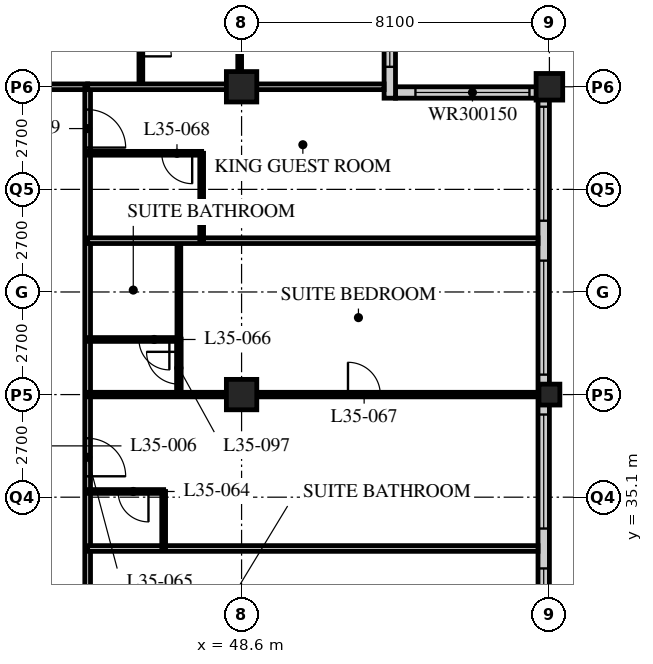
"""IFC4 building model, lengths in metres.
Left out: names, types, materials, properties, quantities, classifications, styles, units other than length and angle.
Written with IfcOpenShell. Run it as: python <this file> out.ifc"""

import sys

from ifc_helpers import new_model, si_unit, direction, frame, frame_2d, origin, origin_2d, place, context, subcontext, project, spatial, rectangle, hollow_rectangle, extrude, element, fill, save


model = new_model("IFC4")
c1 = context("Model", 3, precision=1e-05, world=origin(), true_north=direction((0.0, 1.0)))
c2 = subcontext(c1, "Body", "Model", "MODEL_VIEW")
j1 = project(units=[si_unit("LENGTHUNIT", "METRE"), si_unit("PLANEANGLEUNIT", "RADIAN")], contexts=[c1])
p1 = place(None, origin())
s1 = spatial("IfcSite", under=j1, at=p1, CompositionType="ELEMENT")
p2 = place(p1, origin())
s2 = spatial("IfcBuilding", under=s1, at=p2, CompositionType="ELEMENT")
p3 = place(p2, frame((0.0, 0.0, 137.4)))
s3 = spatial("IfcBuildingStorey", under=s2, at=p3, CompositionType="ELEMENT", Elevation=137.4)
for number, where, z_axis, x_axis in (
    (1, (48.6, 37.8, 0.0), (0.0, 0.0, 1.0), (1.0, 0.0, 0.0)),
    (2, (48.6, 45.9, 0.0), (0.0, 0.0, 1.0), (1.0, 0.0, 0.0)),
):
    element("IfcColumn", number, at=place(p3, frame(where, z_axis=z_axis, x_axis=x_axis)), inside=s3, PredefinedType="COLUMN", context=c2, shape_type="SweptSolid", body=[
        extrude(hollow_rectangle(XDim=0.8, YDim=0.8, WallThickness=0.08, at=origin_2d()), origin(), (0.0, 0.0, 1.0), 3.4),
    ])
p4 = place(p3, frame((56.7, 37.8, 0.0), z_axis=(0.0, 0.0, 1.0), x_axis=(1.0, 0.0, 0.0)))
e3 = element("IfcColumn", 3, at=p4, inside=s3, PredefinedType="COLUMN", context=c2, shape_type="SweptSolid", body=[
    extrude(hollow_rectangle(XDim=0.55, YDim=0.55, WallThickness=0.04, at=origin_2d()), origin(), (0.0, 0.0, 1.0), 3.4),
])
p5 = place(p3, frame((56.7, 45.9, 0.0), z_axis=(0.0, 0.0, 1.0), x_axis=(1.0, 0.0, 0.0)))
e4 = element("IfcColumn", 4, at=p5, inside=s3, PredefinedType="COLUMN", context=c2, shape_type="SweptSolid", body=[
    extrude(hollow_rectangle(XDim=0.7, YDim=0.7, WallThickness=0.07, at=origin_2d()), origin(), (0.0, 0.0, 1.0), 3.4),
])
p6 = place(p3, frame((56.55, 13.8, 0.0), z_axis=(0.0, 0.0, 1.0), x_axis=(0.0, 1.0, 0.0)))
e5 = element("IfcWall", 5, at=p6, inside=s3, PredefinedType="SOLIDWALL", context=c2, shape_type="SweptSolid", body=[
    extrude(rectangle(XDim=32.1, YDim=0.3, at=frame_2d((16.05, 0.0))), origin(), (0.0, 0.0, 1.0), 3.19),
])
p7 = place(p6, frame((0.225, 0.0, 0.9)))
e6 = element("IfcOpeningElement", 6, at=p7, cuts=e5, PredefinedType="OPENING", context=c2, shape_type="SweptSolid", body=[
    extrude(rectangle(XDim=3.0, YDim=2.0, at=frame_2d((1.5, 1.0))), frame((0.0, 0.16, 0.0), z_axis=(0.0, -1.0, 0.0), x_axis=(1.0, 0.0, 0.0)), (0.0, 0.0, 1.0), 0.32),
])
p8 = place(p6, frame((4.275, 0.0, 0.9)))
e7 = element("IfcOpeningElement", 7, at=p8, cuts=e5, PredefinedType="OPENING", context=c2, shape_type="SweptSolid", body=[
    extrude(rectangle(XDim=3.0, YDim=2.0, at=frame_2d((1.5, 1.0))), frame((0.0, 0.16, 0.0), z_axis=(0.0, -1.0, 0.0), x_axis=(1.0, 0.0, 0.0)), (0.0, 0.0, 1.0), 0.32),
])
p9 = place(p6, frame((8.325, 0.0, 0.9)))
e8 = element("IfcOpeningElement", 8, at=p9, cuts=e5, PredefinedType="OPENING", context=c2, shape_type="SweptSolid", body=[
    extrude(rectangle(XDim=3.0, YDim=2.0, at=frame_2d((1.5, 1.0))), frame((0.0, 0.16, 0.0), z_axis=(0.0, -1.0, 0.0), x_axis=(1.0, 0.0, 0.0)), (0.0, 0.0, 1.0), 0.32),
])
p10 = place(p6, frame((12.375, 0.0, 0.9)))
e9 = element("IfcOpeningElement", 9, at=p10, cuts=e5, PredefinedType="OPENING", context=c2, shape_type="SweptSolid", body=[
    extrude(rectangle(XDim=3.0, YDim=2.0, at=frame_2d((1.5, 1.0))), frame((0.0, 0.16, 0.0), z_axis=(0.0, -1.0, 0.0), x_axis=(1.0, 0.0, 0.0)), (0.0, 0.0, 1.0), 0.32),
])
p11 = place(p6, frame((16.425, 0.0, 0.9)))
e10 = element("IfcOpeningElement", 10, at=p11, cuts=e5, PredefinedType="OPENING", context=c2, shape_type="SweptSolid", body=[
    extrude(rectangle(XDim=3.0, YDim=2.0, at=frame_2d((1.5, 1.0))), frame((0.0, 0.16, 0.0), z_axis=(0.0, -1.0, 0.0), x_axis=(1.0, 0.0, 0.0)), (0.0, 0.0, 1.0), 0.32),
])
p12 = place(p6, frame((20.475, 0.0, 0.9)))
e11 = element("IfcOpeningElement", 11, at=p12, cuts=e5, PredefinedType="OPENING", context=c2, shape_type="SweptSolid", body=[
    extrude(rectangle(XDim=3.0, YDim=2.0, at=frame_2d((1.5, 1.0))), frame((0.0, 0.16, 0.0), z_axis=(0.0, -1.0, 0.0), x_axis=(1.0, 0.0, 0.0)), (0.0, 0.0, 1.0), 0.32),
])
p13 = place(p6, frame((24.525, 0.0, 0.9)))
e12 = element("IfcOpeningElement", 12, at=p13, cuts=e5, PredefinedType="OPENING", context=c2, shape_type="SweptSolid", body=[
    extrude(rectangle(XDim=3.0, YDim=2.0, at=frame_2d((1.5, 1.0))), frame((0.0, 0.16, 0.0), z_axis=(0.0, -1.0, 0.0), x_axis=(1.0, 0.0, 0.0)), (0.0, 0.0, 1.0), 0.32),
])
p14 = place(p6, frame((28.575, 0.0, 0.9)))
e13 = element("IfcOpeningElement", 13, at=p14, cuts=e5, PredefinedType="OPENING", context=c2, shape_type="SweptSolid", body=[
    extrude(rectangle(XDim=3.0, YDim=2.0, at=frame_2d((1.5, 1.0))), frame((0.0, 0.16, 0.0), z_axis=(0.0, -1.0, 0.0), x_axis=(1.0, 0.0, 0.0)), (0.0, 0.0, 1.0), 0.32),
])
p15 = place(p3, frame((56.4, 45.75, 0.0), z_axis=(0.0, 0.0, 1.0), x_axis=(-1.0, 0.0, 0.0)))
e14 = element("IfcWall", 14, at=p15, inside=s3, PredefinedType="SOLIDWALL", context=c2, shape_type="SweptSolid", body=[
    extrude(rectangle(XDim=3.75, YDim=0.3, at=frame_2d((1.875, 0.0))), origin(), (0.0, 0.0, 1.0), 3.19),
])
p16 = place(p15, frame((0.225, 0.0, 0.9)))
e15 = element("IfcOpeningElement", 15, at=p16, cuts=e14, PredefinedType="OPENING", context=c2, shape_type="SweptSolid", body=[
    extrude(rectangle(XDim=3.0, YDim=1.5, at=frame_2d((1.5, 0.75))), frame((0.0, 0.16, 0.0), z_axis=(0.0, -1.0, 0.0), x_axis=(1.0, 0.0, 0.0)), (0.0, 0.0, 1.0), 0.32),
])
p17 = place(p3, frame((52.5, 45.6, 0.0), z_axis=(0.0, 0.0, 1.0), x_axis=(0.0, 1.0, 0.0)))
e16 = element("IfcWall", 16, at=p17, inside=s3, PredefinedType="SOLIDWALL", context=c2, shape_type="SweptSolid", body=[
    extrude(rectangle(XDim=4.35, YDim=0.3, at=frame_2d((2.175, 0.0))), origin(), (0.0, 0.0, 1.0), 3.19),
])
p18 = place(p17, frame((0.825, 0.0, 0.9)))
e17 = element("IfcOpeningElement", 17, at=p18, cuts=e16, PredefinedType="OPENING", context=c2, shape_type="SweptSolid", body=[
    extrude(rectangle(XDim=3.0, YDim=1.5, at=frame_2d((1.5, 0.75))), frame((0.0, 0.16, 0.0), z_axis=(0.0, -1.0, 0.0), x_axis=(1.0, 0.0, 0.0)), (0.0, 0.0, 1.0), 0.32),
])
p19 = place(p3, frame((8.1, 45.9, 0.0), z_axis=(0.0, 0.0, 1.0), x_axis=(1.0, 0.0, 0.0)))
e18 = element("IfcWall", 18, at=p19, inside=s3, PredefinedType="PARTITIONING", context=c2, shape_type="SweptSolid", body=[
    extrude(rectangle(XDim=36.45, YDim=0.15, at=frame_2d((18.225, 0.0))), origin(), (0.0, 0.0, 1.0), 2.578),
])
p20 = place(p19, frame((9.625, 0.0, 0.0)))
e19 = element("IfcOpeningElement", 19, at=p20, cuts=e18, PredefinedType="OPENING", context=c2, shape_type="SweptSolid", body=[
    extrude(rectangle(XDim=1.0, YDim=2.1, at=frame_2d((0.5, 1.05))), frame((0.0, 0.085, 0.0), z_axis=(0.0, -1.0, 0.0), x_axis=(1.0, 0.0, 0.0)), (0.0, 0.0, 1.0), 0.17),
])
p21 = place(p19, frame((21.775, 0.0, 0.0)))
e20 = element("IfcOpeningElement", 20, at=p21, cuts=e18, PredefinedType="OPENING", context=c2, shape_type="SweptSolid", body=[
    extrude(rectangle(XDim=1.0, YDim=2.1, at=frame_2d((0.5, 1.05))), frame((0.0, 0.085, 0.0), z_axis=(0.0, -1.0, 0.0), x_axis=(1.0, 0.0, 0.0)), (0.0, 0.0, 1.0), 0.17),
])
p22 = place(p19, frame((28.95, 0.0, 0.0)))
e21 = element("IfcOpeningElement", 21, at=p22, cuts=e18, PredefinedType="OPENING", context=c2, shape_type="SweptSolid", body=[
    extrude(rectangle(XDim=1.0, YDim=2.1, at=frame_2d((0.5, 1.05))), frame((0.0, 0.085, 0.0), z_axis=(0.0, -1.0, 0.0), x_axis=(1.0, 0.0, 0.0)), (0.0, 0.0, 1.0), 0.17),
])
p23 = place(p19, frame((33.925, 0.0, 0.0)))
e22 = element("IfcOpeningElement", 22, at=p23, cuts=e18, PredefinedType="OPENING", context=c2, shape_type="SweptSolid", body=[
    extrude(rectangle(XDim=1.0, YDim=2.1, at=frame_2d((0.5, 1.05))), frame((0.0, 0.085, 0.0), z_axis=(0.0, -1.0, 0.0), x_axis=(1.0, 0.0, 0.0)), (0.0, 0.0, 1.0), 0.17),
])
p24 = place(p19, frame((2.625, 0.0, 0.0)))
e23 = element("IfcOpeningElement", 23, at=p24, cuts=e18, PredefinedType="OPENING", context=c2, shape_type="SweptSolid", body=[
    extrude(rectangle(XDim=1.0, YDim=2.1, at=frame_2d((0.5, 1.05))), frame((0.0, 0.085, 0.0), z_axis=(0.0, -1.0, 0.0), x_axis=(1.0, 0.0, 0.0)), (0.0, 0.0, 1.0), 0.17),
])
p25 = place(p3, frame((44.55, 17.55, 0.0), z_axis=(0.0, 0.0, 1.0), x_axis=(0.0, 1.0, 0.0)))
e24 = element("IfcWall", 24, at=p25, inside=s3, PredefinedType="PARTITIONING", context=c2, shape_type="SweptSolid", body=[
    extrude(rectangle(XDim=28.35, YDim=0.15, at=frame_2d((14.175, 0.0))), origin(), (0.0, 0.0, 1.0), 3.19),
])
p26 = place(p25, frame((2.75, 0.0, 0.0)))
e25 = element("IfcOpeningElement", 25, at=p26, cuts=e24, PredefinedType="OPENING", context=c2, shape_type="SweptSolid", body=[
    extrude(rectangle(XDim=1.0, YDim=2.1, at=frame_2d((0.5, 1.05))), frame((0.0, 0.085, 0.0), z_axis=(0.0, -1.0, 0.0), x_axis=(1.0, 0.0, 0.0)), (0.0, 0.0, 1.0), 0.17),
])
p27 = place(p25, frame((6.5, 0.0, 0.0)))
e26 = element("IfcOpeningElement", 26, at=p27, cuts=e24, PredefinedType="OPENING", context=c2, shape_type="SweptSolid", body=[
    extrude(rectangle(XDim=1.0, YDim=2.1, at=frame_2d((0.5, 1.05))), frame((0.0, 0.085, 0.0), z_axis=(0.0, -1.0, 0.0), x_axis=(1.0, 0.0, 0.0)), (0.0, 0.0, 1.0), 0.17),
])
p28 = place(p25, frame((13.55, 0.0, 0.0)))
e27 = element("IfcOpeningElement", 27, at=p28, cuts=e24, PredefinedType="OPENING", context=c2, shape_type="SweptSolid", body=[
    extrude(rectangle(XDim=1.0, YDim=2.1, at=frame_2d((0.5, 1.05))), frame((0.0, 0.085, 0.0), z_axis=(0.0, -1.0, 0.0), x_axis=(1.0, 0.0, 0.0)), (0.0, 0.0, 1.0), 0.17),
])
p29 = place(p25, frame((18.1, 0.0, 0.0)))
e28 = element("IfcOpeningElement", 28, at=p29, cuts=e24, PredefinedType="OPENING", context=c2, shape_type="SweptSolid", body=[
    extrude(rectangle(XDim=1.0, YDim=2.1, at=frame_2d((0.5, 1.05))), frame((0.0, 0.085, 0.0), z_axis=(0.0, -1.0, 0.0), x_axis=(1.0, 0.0, 0.0)), (0.0, 0.0, 1.0), 0.17),
])
p30 = place(p25, frame((26.75, 0.0, 0.0)))
e29 = element("IfcOpeningElement", 29, at=p30, cuts=e24, PredefinedType="OPENING", context=c2, shape_type="SweptSolid", body=[
    extrude(rectangle(XDim=1.0, YDim=2.1, at=frame_2d((0.5, 1.05))), frame((0.0, 0.085, 0.0), z_axis=(0.0, -1.0, 0.0), x_axis=(1.0, 0.0, 0.0)), (0.0, 0.0, 1.0), 0.17),
])
p31 = place(p3, frame((44.55, 33.75, 0.0), z_axis=(0.0, 0.0, 1.0), x_axis=(1.0, 0.0, 0.0)))
e30 = element("IfcWall", 30, at=p31, inside=s3, PredefinedType="PARTITIONING", context=c2, shape_type="SweptSolid", body=[
    extrude(rectangle(XDim=11.85, YDim=0.15, at=frame_2d((5.925, 0.0))), origin(), (0.0, 0.0, 1.0), 3.19),
])
p32 = place(p3, frame((46.55, 33.75, 0.0), z_axis=(0.0, 0.0, 1.0), x_axis=(0.0, 1.0, 0.0)))
e31 = element("IfcWall", 31, at=p32, inside=s3, PredefinedType="PARTITIONING", context=c2, shape_type="SweptSolid", body=[
    extrude(rectangle(XDim=1.5, YDim=0.1, at=frame_2d((0.75, 0.0))), origin(), (0.0, 0.0, 1.0), 3.19),
])
p33 = place(p3, frame((44.55, 35.25, 0.0), z_axis=(0.0, 0.0, 1.0), x_axis=(1.0, 0.0, 0.0)))
e32 = element("IfcWall", 32, at=p33, inside=s3, PredefinedType="PARTITIONING", context=c2, shape_type="SweptSolid", body=[
    extrude(rectangle(XDim=2.0, YDim=0.1, at=frame_2d((1.0, 0.0))), origin(), (0.0, 0.0, 1.0), 3.19),
])
p34 = place(p33, frame((0.8, 0.0, 0.0)))
e33 = element("IfcOpeningElement", 33, at=p34, cuts=e32, PredefinedType="OPENING", context=c2, shape_type="SweptSolid", body=[
    extrude(rectangle(XDim=0.8, YDim=2.1, at=frame_2d((0.4, 1.05))), frame((0.0, 0.06, 0.0), z_axis=(0.0, -1.0, 0.0), x_axis=(1.0, 0.0, 0.0)), (0.0, 0.0, 1.0), 0.12),
])
p35 = place(p3, frame((46.95, 39.25, 0.0), z_axis=(0.0, 0.0, 1.0), x_axis=(0.0, 1.0, 0.0)))
e34 = element("IfcWall", 34, at=p35, inside=s3, PredefinedType="PARTITIONING", context=c2, shape_type="SweptSolid", body=[
    extrude(rectangle(XDim=2.6, YDim=0.1, at=frame_2d((1.3, 0.0))), origin(), (0.0, 0.0, 1.0), 3.19),
])
p36 = place(p3, frame((44.55, 39.25, 0.0), z_axis=(0.0, 0.0, 1.0), x_axis=(1.0, 0.0, 0.0)))
e35 = element("IfcWall", 35, at=p36, inside=s3, PredefinedType="PARTITIONING", context=c2, shape_type="SweptSolid", body=[
    extrude(rectangle(XDim=2.4, YDim=0.1, at=frame_2d((1.2, 0.0))), origin(), (0.0, 0.0, 1.0), 3.19),
])
p37 = place(p36, frame((1.35, 0.0, 0.0)))
e36 = element("IfcOpeningElement", 36, at=p37, cuts=e35, PredefinedType="OPENING", context=c2, shape_type="SweptSolid", body=[
    extrude(rectangle(XDim=0.8, YDim=2.1, at=frame_2d((0.4, 1.05))), frame((0.0, 0.06, 0.0), z_axis=(0.0, -1.0, 0.0), x_axis=(1.0, 0.0, 0.0)), (0.0, 0.0, 1.0), 0.12),
])
p38 = place(p3, frame((44.55, 37.8, 0.0), z_axis=(0.0, 0.0, 1.0), x_axis=(1.0, 0.0, 0.0)))
e37 = element("IfcWall", 37, at=p38, inside=s3, PredefinedType="PARTITIONING", context=c2, shape_type="SweptSolid", body=[
    extrude(rectangle(XDim=11.85, YDim=0.12, at=frame_2d((5.925, 0.0))), origin(), (0.0, 0.0, 1.0), 2.578),
])
p39 = place(p38, frame((6.85, 0.0, 0.0)))
e38 = element("IfcOpeningElement", 38, at=p39, cuts=e37, PredefinedType="OPENING", context=c2, shape_type="SweptSolid", body=[
    extrude(rectangle(XDim=0.85, YDim=2.1, at=frame_2d((0.425, 1.05))), frame((0.0, 0.07, 0.0), z_axis=(0.0, -1.0, 0.0), x_axis=(1.0, 0.0, 0.0)), (0.0, 0.0, 1.0), 0.14),
])
p40 = place(p3, frame((44.55, 41.85, 0.0), z_axis=(0.0, 0.0, 1.0), x_axis=(1.0, 0.0, 0.0)))
e39 = element("IfcWall", 39, at=p40, inside=s3, PredefinedType="PARTITIONING", context=c2, shape_type="SweptSolid", body=[
    extrude(rectangle(XDim=11.85, YDim=0.15, at=frame_2d((5.925, 0.0))), origin(), (0.0, 0.0, 1.0), 3.19),
])
p41 = place(p3, frame((47.55, 41.85, 0.0), z_axis=(0.0, 0.0, 1.0), x_axis=(0.0, 1.0, 0.0)))
e40 = element("IfcWall", 40, at=p41, inside=s3, PredefinedType="PARTITIONING", context=c2, shape_type="SweptSolid", body=[
    extrude(rectangle(XDim=2.3, YDim=0.1, at=frame_2d((1.15, 0.0))), origin(), (0.0, 0.0, 1.0), 3.19),
])
p42 = place(p3, frame((44.55, 44.15, 0.0), z_axis=(0.0, 0.0, 1.0), x_axis=(1.0, 0.0, 0.0)))
e41 = element("IfcWall", 41, at=p42, inside=s3, PredefinedType="PARTITIONING", context=c2, shape_type="SweptSolid", body=[
    extrude(rectangle(XDim=3.0, YDim=0.1, at=frame_2d((1.5, 0.0))), origin(), (0.0, 0.0, 1.0), 3.19),
])
p43 = place(p42, frame((1.95, 0.0, 0.0)))
e42 = element("IfcOpeningElement", 42, at=p43, cuts=e41, PredefinedType="OPENING", context=c2, shape_type="SweptSolid", body=[
    extrude(rectangle(XDim=0.8, YDim=2.1, at=frame_2d((0.4, 1.05))), frame((0.0, 0.06, 0.0), z_axis=(0.0, -1.0, 0.0), x_axis=(1.0, 0.0, 0.0)), (0.0, 0.0, 1.0), 0.12),
])
p44 = place(p3, frame((45.95, 45.9, 0.0), z_axis=(0.0, 0.0, 1.0), x_axis=(0.0, 1.0, 0.0)))
e43 = element("IfcWall", 43, at=p44, inside=s3, PredefinedType="PARTITIONING", context=c2, shape_type="SweptSolid", body=[
    extrude(rectangle(XDim=2.4, YDim=0.1, at=frame_2d((1.2, 0.0))), origin(), (0.0, 0.0, 1.0), 3.19),
])
p45 = place(p44, frame((0.8, 0.0, 0.0)))
e44 = element("IfcOpeningElement", 44, at=p45, cuts=e43, PredefinedType="OPENING", context=c2, shape_type="SweptSolid", body=[
    extrude(rectangle(XDim=0.8, YDim=2.1, at=frame_2d((0.4, 1.05))), frame((0.0, 0.06, 0.0), z_axis=(0.0, -1.0, 0.0), x_axis=(1.0, 0.0, 0.0)), (0.0, 0.0, 1.0), 0.12),
])
p46 = place(p3, frame((48.55, 45.9, 0.0), z_axis=(0.0, 0.0, 1.0), x_axis=(0.0, 1.0, 0.0)))
e45 = element("IfcWall", 45, at=p46, inside=s3, PredefinedType="PARTITIONING", context=c2, shape_type="SweptSolid", body=[
    extrude(rectangle(XDim=2.4, YDim=0.1, at=frame_2d((1.2, 0.0))), origin(), (0.0, 0.0, 1.0), 2.578),
])
p47 = place(p3, frame((44.55, 45.9, 0.0), z_axis=(0.0, 0.0, 1.0), x_axis=(1.0, 0.0, 0.0)))
e46 = element("IfcWall", 46, at=p47, inside=s3, PredefinedType="PARTITIONING", context=c2, shape_type="SweptSolid", body=[
    extrude(rectangle(XDim=7.8, YDim=0.15, at=frame_2d((3.9, 0.0))), origin(), (0.0, 0.0, 1.0), 2.578),
])
p48 = place(p3, frame((46.95, 39.26, 0.0), z_axis=(0.0, 0.0, 1.0), x_axis=(0.0, -1.0, 0.0)))
e47 = element("IfcWall", 47, at=p48, inside=s3, PredefinedType="PARTITIONING", context=c2, shape_type="SweptSolid", body=[
    extrude(rectangle(XDim=1.46, YDim=0.12, at=frame_2d((0.73, 0.0))), origin(), (0.0, 0.0, 1.0), 3.19),
])
p49 = place(p48, frame((0.335, 0.0, 0.0)))
e48 = element("IfcOpeningElement", 48, at=p49, cuts=e47, PredefinedType="OPENING", context=c2, shape_type="SweptSolid", body=[
    extrude(rectangle(XDim=0.85, YDim=2.1, at=frame_2d((0.425, 1.05))), frame((0.0, 0.07, 0.0), z_axis=(0.0, -1.0, 0.0), x_axis=(1.0, 0.0, 0.0)), (0.0, 0.0, 1.0), 0.14),
])
p50 = place(p11, origin())
e49 = element("IfcWindow", 49, at=p50, inside=s3, PartitioningType="SINGLE_PANEL", PredefinedType="WINDOW", context=c2, shape_type="SweptSolid", body=[
    extrude(rectangle(XDim=3.0, YDim=2.0, at=frame_2d((1.5, 1.0))), frame((0.0, 0.03, 0.0), z_axis=(0.0, -1.0, 0.0), x_axis=(1.0, 0.0, 0.0)), (0.0, 0.0, 1.0), 0.06),
])
fill(e10, e49)
p51 = place(p12, origin())
e50 = element("IfcWindow", 50, at=p51, inside=s3, PartitioningType="SINGLE_PANEL", PredefinedType="WINDOW", context=c2, shape_type="SweptSolid", body=[
    extrude(rectangle(XDim=3.0, YDim=2.0, at=frame_2d((1.5, 1.0))), frame((0.0, 0.03, 0.0), z_axis=(0.0, -1.0, 0.0), x_axis=(1.0, 0.0, 0.0)), (0.0, 0.0, 1.0), 0.06),
])
fill(e11, e50)
p52 = place(p13, origin())
e51 = element("IfcWindow", 51, at=p52, inside=s3, PartitioningType="SINGLE_PANEL", PredefinedType="WINDOW", context=c2, shape_type="SweptSolid", body=[
    extrude(rectangle(XDim=3.0, YDim=2.0, at=frame_2d((1.5, 1.0))), frame((0.0, 0.03, 0.0), z_axis=(0.0, -1.0, 0.0), x_axis=(1.0, 0.0, 0.0)), (0.0, 0.0, 1.0), 0.06),
])
fill(e12, e51)
p53 = place(p14, origin())
e52 = element("IfcWindow", 52, at=p53, inside=s3, PartitioningType="SINGLE_PANEL", PredefinedType="WINDOW", context=c2, shape_type="SweptSolid", body=[
    extrude(rectangle(XDim=3.0, YDim=2.0, at=frame_2d((1.5, 1.0))), frame((0.0, 0.03, 0.0), z_axis=(0.0, -1.0, 0.0), x_axis=(1.0, 0.0, 0.0)), (0.0, 0.0, 1.0), 0.06),
])
fill(e13, e52)
p54 = place(p16, origin())
e53 = element("IfcWindow", 53, at=p54, inside=s3, PartitioningType="SINGLE_PANEL", PredefinedType="WINDOW", context=c2, shape_type="SweptSolid", body=[
    extrude(rectangle(XDim=3.0, YDim=1.5, at=frame_2d((1.5, 0.75))), frame((0.0, 0.03, 0.0), z_axis=(0.0, -1.0, 0.0), x_axis=(1.0, 0.0, 0.0)), (0.0, 0.0, 1.0), 0.06),
])
fill(e15, e53)
p55 = place(p18, origin())
e54 = element("IfcWindow", 54, at=p55, inside=s3, PartitioningType="SINGLE_PANEL", PredefinedType="WINDOW", context=c2, shape_type="SweptSolid", body=[
    extrude(rectangle(XDim=3.0, YDim=1.5, at=frame_2d((1.5, 0.75))), frame((0.0, 0.03, 0.0), z_axis=(0.0, -1.0, 0.0), x_axis=(1.0, 0.0, 0.0)), (0.0, 0.0, 1.0), 0.06),
])
fill(e17, e54)
p56 = place(p34, origin())
e55 = element("IfcDoor", 55, at=p56, inside=s3, OperationType="SINGLE_SWING_LEFT", PredefinedType="DOOR", context=c2, shape_type="SweptSolid", body=[
    extrude(rectangle(XDim=0.8, YDim=2.1, at=frame_2d((0.4, 1.05))), frame((0.0, 0.025, 0.0), z_axis=(0.0, -1.0, 0.0), x_axis=(1.0, 0.0, 0.0)), (0.0, 0.0, 1.0), 0.05),
])
fill(e33, e55)
p57 = place(p29, origin())
e56 = element("IfcDoor", 56, at=p57, inside=s3, OperationType="SINGLE_SWING_RIGHT", PredefinedType="DOOR", context=c2, shape_type="SweptSolid", body=[
    extrude(rectangle(XDim=1.0, YDim=2.1, at=frame_2d((0.5, 1.05))), frame((0.0, 0.025, 0.0), z_axis=(0.0, -1.0, 0.0), x_axis=(1.0, 0.0, 0.0)), (0.0, 0.0, 1.0), 0.05),
])
fill(e28, e56)
p58 = place(p37, origin())
e57 = element("IfcDoor", 57, at=p58, inside=s3, OperationType="SINGLE_SWING_LEFT", PredefinedType="DOOR", context=c2, shape_type="SweptSolid", body=[
    extrude(rectangle(XDim=0.8, YDim=2.1, at=frame_2d((0.4, 1.05))), frame((0.0, 0.025, 0.0), z_axis=(0.0, -1.0, 0.0), x_axis=(1.0, 0.0, 0.0)), (0.0, 0.0, 1.0), 0.05),
])
fill(e36, e57)
p59 = place(p39, origin())
e58 = element("IfcDoor", 58, at=p59, inside=s3, OperationType="SINGLE_SWING_LEFT", PredefinedType="DOOR", context=c2, shape_type="SweptSolid", body=[
    extrude(rectangle(XDim=0.85, YDim=2.1, at=frame_2d((0.425, 1.05))), frame((0.0, 0.025, 0.0), z_axis=(0.0, -1.0, 0.0), x_axis=(1.0, 0.0, 0.0)), (0.0, 0.0, 1.0), 0.05),
])
fill(e38, e58)
p60 = place(p43, origin())
e59 = element("IfcDoor", 59, at=p60, inside=s3, OperationType="SINGLE_SWING_LEFT", PredefinedType="DOOR", context=c2, shape_type="SweptSolid", body=[
    extrude(rectangle(XDim=0.8, YDim=2.1, at=frame_2d((0.4, 1.05))), frame((0.0, 0.025, 0.0), z_axis=(0.0, -1.0, 0.0), x_axis=(1.0, 0.0, 0.0)), (0.0, 0.0, 1.0), 0.05),
])
fill(e42, e59)
p61 = place(p30, origin())
e60 = element("IfcDoor", 60, at=p61, inside=s3, OperationType="SINGLE_SWING_RIGHT", PredefinedType="DOOR", context=c2, shape_type="SweptSolid", body=[
    extrude(rectangle(XDim=1.0, YDim=2.1, at=frame_2d((0.5, 1.05))), frame((0.0, 0.025, 0.0), z_axis=(0.0, -1.0, 0.0), x_axis=(1.0, 0.0, 0.0)), (0.0, 0.0, 1.0), 0.05),
])
fill(e29, e60)
p62 = place(p45, origin())
e61 = element("IfcDoor", 61, at=p62, inside=s3, OperationType="SINGLE_SWING_RIGHT", PredefinedType="DOOR", context=c2, shape_type="SweptSolid", body=[
    extrude(rectangle(XDim=0.8, YDim=2.1, at=frame_2d((0.4, 1.05))), frame((0.0, 0.025, 0.0), z_axis=(0.0, -1.0, 0.0), x_axis=(1.0, 0.0, 0.0)), (0.0, 0.0, 1.0), 0.05),
])
fill(e44, e61)
p63 = place(p49, origin())
e62 = element("IfcDoor", 62, at=p63, inside=s3, OperationType="SINGLE_SWING_RIGHT", PredefinedType="DOOR", context=c2, shape_type="SweptSolid", body=[
    extrude(rectangle(XDim=0.85, YDim=2.1, at=frame_2d((0.425, 1.05))), frame((0.0, 0.025, 0.0), z_axis=(0.0, -1.0, 0.0), x_axis=(1.0, 0.0, 0.0)), (0.0, 0.0, 1.0), 0.05),
])
fill(e48, e62)
save(model, sys.argv[1])
